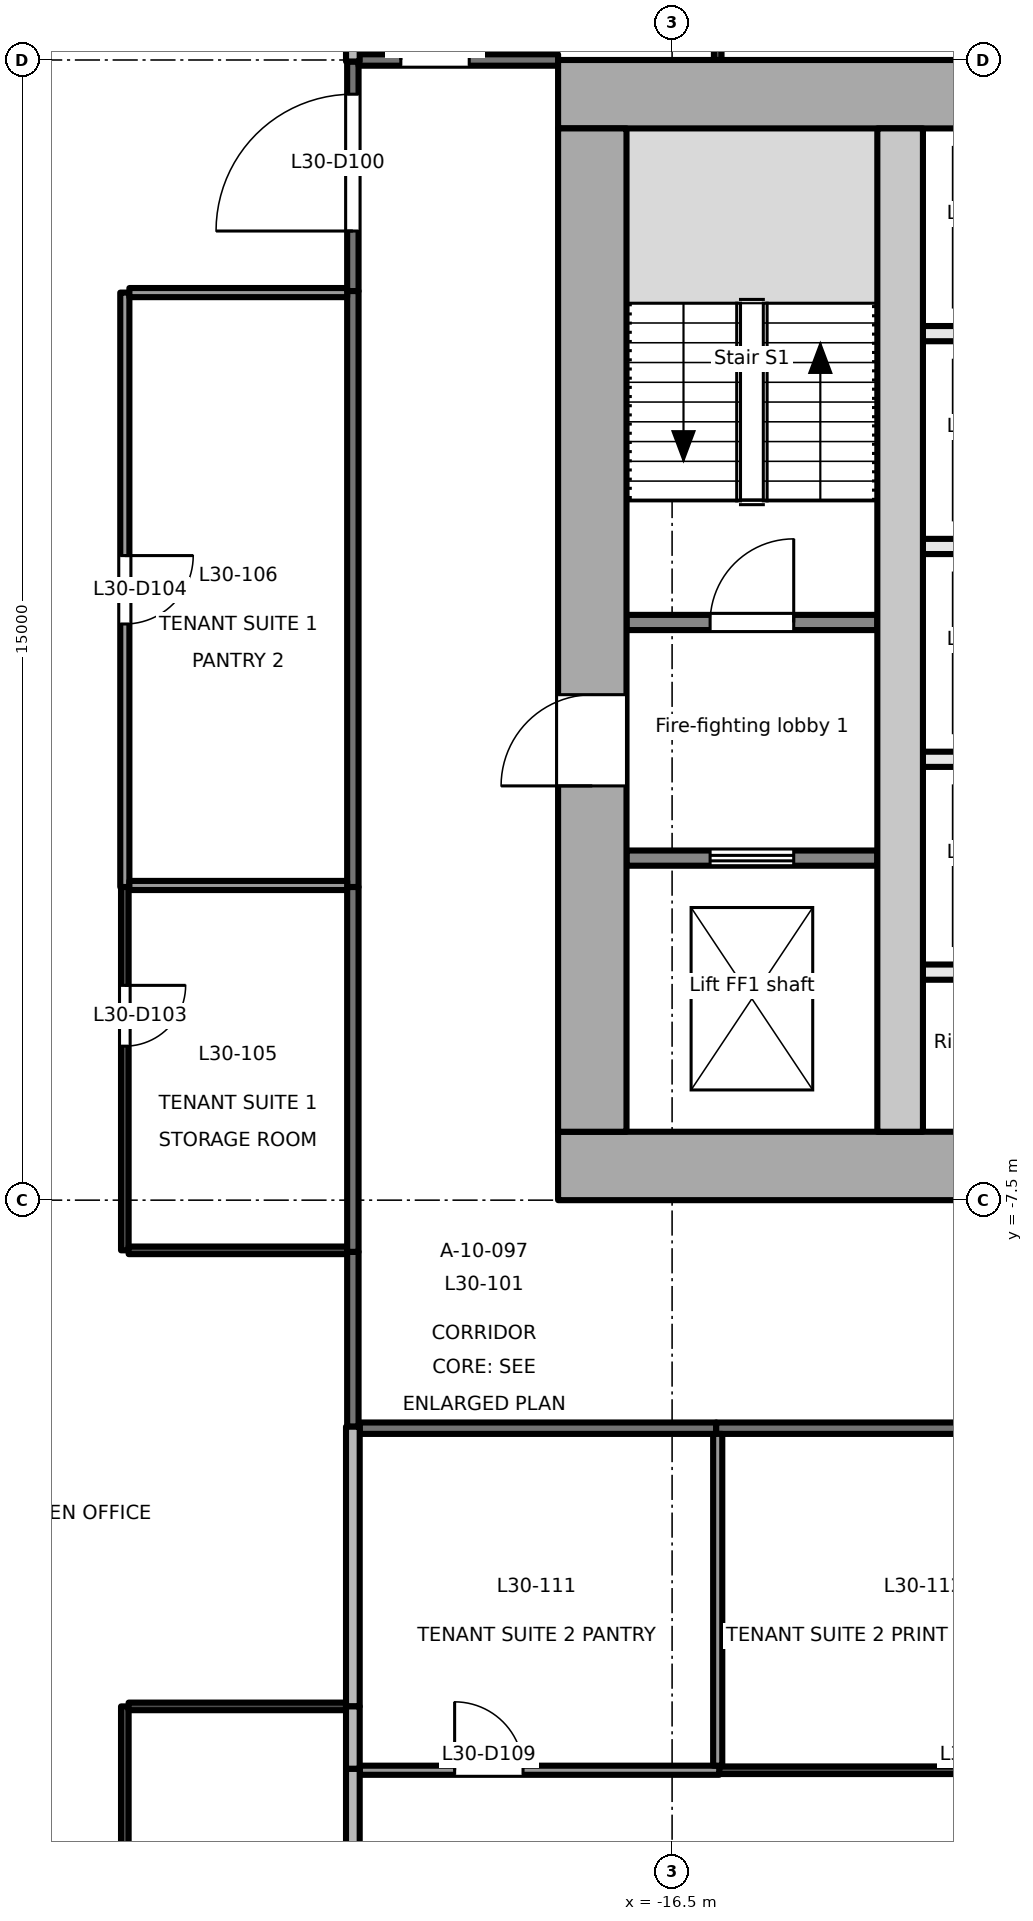
"""IFC4 building model, lengths in metres.
Left out: names, types, materials, properties, quantities, classifications, styles, units other than length and angle.
Written with IfcOpenShell. Run it as: python <this file> out.ifc"""

import sys

from ifc_helpers import new_model, si_unit, direction, frame, frame_2d, origin, place, context, subcontext, project, spatial, rectangle, extrude, element, fill, save


model = new_model("IFC4")
c1 = context("Model", 3, precision=1e-05, world=origin(), true_north=direction((0.0, 1.0)))
c2 = subcontext(c1, "Body", "Model", "MODEL_VIEW")
j1 = project(units=[si_unit("LENGTHUNIT", "METRE"), si_unit("PLANEANGLEUNIT", "RADIAN")], contexts=[c1])
p1 = place(None, origin())
s1 = spatial("IfcSite", under=j1, at=p1, CompositionType="ELEMENT")
p2 = place(p1, origin())
s2 = spatial("IfcBuilding", under=s1, at=p2, CompositionType="ELEMENT")
p3 = place(p2, frame((0.0, 0.0, 134.1)))
s3 = spatial("IfcBuildingStorey", under=s2, at=p3, CompositionType="ELEMENT", Elevation=134.1)
p4 = place(p3, frame((-18.0, -7.05, -0.2), z_axis=(0.0, 0.0, 1.0), x_axis=(1.0, 0.0, 0.0)))
e1 = element("IfcWall", 1, at=p4, inside=s3, PredefinedType="SHEAR", context=c2, shape_type="SweptSolid", body=[
    extrude(rectangle(XDim=36.0, YDim=0.9, at=frame_2d((18.0, 0.0))), origin(), (0.0, 0.0, 1.0), 4.0),
])
p5 = place(p4, frame((7.8, 0.0, 0.2)))
e2 = element("IfcOpeningElement", 2, at=p5, cuts=e1, PredefinedType="OPENING", context=c2, shape_type="SweptSolid", body=[
    extrude(rectangle(XDim=2.4, YDim=2.1, at=frame_2d((1.2, 1.05))), frame((0.0, 0.46, 0.0), z_axis=(0.0, -1.0, 0.0), x_axis=(1.0, 0.0, 0.0)), (0.0, 0.0, 1.0), 0.921),
])
p6 = place(p4, frame((17.4, 0.0, 0.2)))
e3 = element("IfcOpeningElement", 3, at=p6, cuts=e1, PredefinedType="OPENING", context=c2, shape_type="SweptSolid", body=[
    extrude(rectangle(XDim=1.2, YDim=2.1, at=frame_2d((0.6, 1.05))), frame((0.0, 0.46, 0.0), z_axis=(0.0, -1.0, 0.0), x_axis=(1.0, 0.0, 0.0)), (0.0, 0.0, 1.0), 0.921),
])
p7 = place(p4, frame((26.1, 0.0, 0.2)))
e4 = element("IfcOpeningElement", 4, at=p7, cuts=e1, PredefinedType="OPENING", context=c2, shape_type="SweptSolid", body=[
    extrude(rectangle(XDim=2.4, YDim=2.1, at=frame_2d((1.2, 1.05))), frame((0.0, 0.46, 0.0), z_axis=(0.0, -1.0, 0.0), x_axis=(1.0, 0.0, 0.0)), (0.0, 0.0, 1.0), 0.921),
])
p8 = place(p3, frame((-18.0, 7.05, -0.2), z_axis=(0.0, 0.0, 1.0), x_axis=(1.0, 0.0, 0.0)))
e5 = element("IfcWall", 5, at=p8, inside=s3, PredefinedType="SHEAR", context=c2, shape_type="SweptSolid", body=[
    extrude(rectangle(XDim=36.0, YDim=0.9, at=frame_2d((18.0, 0.0))), origin(), (0.0, 0.0, 1.0), 4.0),
])
p9 = place(p3, frame((-17.55, -6.6, -0.2), z_axis=(0.0, 0.0, 1.0), x_axis=(0.0, 1.0, 0.0)))
e6 = element("IfcWall", 6, at=p9, inside=s3, PredefinedType="SHEAR", context=c2, shape_type="SweptSolid", body=[
    extrude(rectangle(XDim=13.2, YDim=0.9, at=frame_2d((6.6, 0.0))), origin(), (0.0, 0.0, 1.0), 4.0),
])
p10 = place(p9, frame((4.55, 0.0, 0.2)))
e7 = element("IfcOpeningElement", 7, at=p10, cuts=e6, PredefinedType="OPENING", context=c2, shape_type="SweptSolid", body=[
    extrude(rectangle(XDim=1.2, YDim=2.1, at=frame_2d((0.6, 1.05))), frame((0.0, 0.46, 0.0), z_axis=(0.0, -1.0, 0.0), x_axis=(1.0, 0.0, 0.0)), (0.0, 0.0, 1.0), 0.921),
])
p11 = place(p3, frame((-13.5, -6.6, -0.2), z_axis=(0.0, 0.0, 1.0), x_axis=(0.0, 1.0, 0.0)))
e8 = element("IfcWall", 8, at=p11, inside=s3, PredefinedType="SHEAR", context=c2, shape_type="SweptSolid", body=[
    extrude(rectangle(XDim=13.2, YDim=0.6, at=frame_2d((6.6, 0.0))), origin(), (0.0, 0.0, 1.0), 4.0),
])
p12 = place(p3, frame((-17.1, -3.0, 0.0), z_axis=(0.0, 0.0, 1.0), x_axis=(1.0, 0.0, 0.0)))
e9 = element("IfcWall", 9, at=p12, inside=s3, PredefinedType="PARTITIONING", context=c2, shape_type="SweptSolid", body=[
    extrude(rectangle(XDim=3.3, YDim=0.2, at=frame_2d((1.65, 0.0))), origin(), (0.0, 0.0, 1.0), 3.8),
])
p13 = place(p12, frame((1.1, 0.0, 0.0)))
e10 = element("IfcOpeningElement", 10, at=p13, cuts=e9, PredefinedType="OPENING", context=c2, shape_type="SweptSolid", body=[
    extrude(rectangle(XDim=1.1, YDim=2.1, at=frame_2d((0.55, 1.05))), frame((0.0, 0.111, 0.0), z_axis=(0.0, -1.0, 0.0), x_axis=(1.0, 0.0, 0.0)), (0.0, 0.0, 1.0), 0.221),
])
p14 = place(p3, frame((-17.1, 0.1, 0.0), z_axis=(0.0, 0.0, 1.0), x_axis=(1.0, 0.0, 0.0)))
e11 = element("IfcWall", 11, at=p14, inside=s3, PredefinedType="PARTITIONING", context=c2, shape_type="SweptSolid", body=[
    extrude(rectangle(XDim=3.3, YDim=0.2, at=frame_2d((1.65, 0.0))), origin(), (0.0, 0.0, 1.0), 3.8),
])
p15 = place(p14, frame((1.1, 0.0, 0.0)))
e12 = element("IfcOpeningElement", 12, at=p15, cuts=e11, PredefinedType="OPENING", context=c2, shape_type="SweptSolid", body=[
    extrude(rectangle(XDim=1.1, YDim=2.1, at=frame_2d((0.55, 1.05))), frame((0.0, 0.111, 0.0), z_axis=(0.0, -1.0, 0.0), x_axis=(1.0, 0.0, 0.0)), (0.0, 0.0, 1.0), 0.221),
])
for number, where, z_axis, x_axis in (
    (13, (-13.2, -1.7, 0.0), (0.0, 0.0, 1.0), (1.0, 0.0, 0.0)),
    (14, (-13.2, 1.1, 0.0), (0.0, 0.0, 1.0), (1.0, 0.0, 0.0)),
    (15, (-13.2, 3.9, 0.0), (0.0, 0.0, 1.0), (1.0, 0.0, 0.0)),
    (16, (-13.2, -4.5, 0.0), (0.0, 0.0, 1.0), (1.0, 0.0, 0.0)),
):
    element("IfcWall", number, at=place(p3, frame(where, z_axis=z_axis, x_axis=x_axis)), inside=s3, PredefinedType="PARTITIONING", context=c2, shape_type="SweptSolid", body=[
        extrude(rectangle(XDim=2.3, YDim=0.2, at=frame_2d((1.15, 0.0))), origin(), (0.0, 0.0, 1.0), 3.8),
    ])
p16 = place(p3, frame((-20.7, -10.48, 0.0), z_axis=(0.0, 0.0, 1.0), x_axis=(0.0, 1.0, 0.0)))
e17 = element("IfcWall", 17, at=p16, inside=s3, PredefinedType="PARTITIONING", context=c2, shape_type="SweptSolid", body=[
    extrude(rectangle(XDim=2.3, YDim=0.15, at=frame_2d((1.15, 0.0))), origin(), (0.0, 0.0, 1.0), 3.8),
])
p17 = place(p3, frame((-20.7, 4.46, 0.0), z_axis=(0.0, 0.0, 1.0), x_axis=(0.0, 1.0, 0.0)))
e18 = element("IfcWall", 18, at=p17, inside=s3, PredefinedType="PARTITIONING", context=c2, shape_type="SweptSolid", body=[
    extrude(rectangle(XDim=3.02, YDim=0.15, at=frame_2d((1.51, 0.0))), origin(), (0.0, 0.0, 1.0), 3.3),
])
p18 = place(p17, frame((0.79, 0.0, 0.0)))
e19 = element("IfcOpeningElement", 19, at=p18, cuts=e18, PredefinedType="OPENING", context=c2, shape_type="SweptSolid", body=[
    extrude(rectangle(XDim=1.8, YDim=2.1, at=frame_2d((0.9, 1.05))), frame((0.0, 0.085, 0.0), z_axis=(0.0, -1.0, 0.0), x_axis=(1.0, 0.0, 0.0)), (0.0, 0.0, 1.0), 0.171),
])
p19 = place(p3, frame((-20.7, -8.18, 0.0), z_axis=(0.0, 0.0, 1.0), x_axis=(0.0, 1.0, 0.0)))
e20 = element("IfcWall", 20, at=p19, inside=s3, PredefinedType="PARTITIONING", context=c2, shape_type="SweptSolid", body=[
    extrude(rectangle(XDim=4.8, YDim=0.15, at=frame_2d((2.4, 0.0))), origin(), (0.0, 0.0, 1.0), 3.3),
])
p20 = place(p3, frame((-20.7, -3.38, 0.0), z_axis=(0.0, 0.0, 1.0), x_axis=(0.0, 1.0, 0.0)))
e21 = element("IfcWall", 21, at=p20, inside=s3, PredefinedType="PARTITIONING", context=c2, shape_type="SweptSolid", body=[
    extrude(rectangle(XDim=7.84, YDim=0.15, at=frame_2d((3.92, 0.0))), origin(), (0.0, 0.0, 1.0), 3.3),
])
p21 = place(p3, frame((-15.92, -10.5, 0.0), z_axis=(0.0, 0.0, 1.0), x_axis=(-1.0, 0.0, 0.0)))
e22 = element("IfcWall", 22, at=p21, inside=s3, PredefinedType="PARTITIONING", context=c2, shape_type="SweptSolid", body=[
    extrude(rectangle(XDim=4.69, YDim=0.15, at=frame_2d((2.345, 0.0))), origin(), (0.0, 0.0, 1.0), 3.8),
])
p22 = place(p3, frame((-10.48, -10.5, 0.0), z_axis=(0.0, 0.0, 1.0), x_axis=(-1.0, 0.0, 0.0)))
e23 = element("IfcWall", 23, at=p22, inside=s3, PredefinedType="PARTITIONING", context=c2, shape_type="SweptSolid", body=[
    extrude(rectangle(XDim=5.44, YDim=0.15, at=frame_2d((2.72, 0.0))), origin(), (0.0, 0.0, 1.0), 2.9),
])
p23 = place(p3, frame((-20.625, 7.5, 0.0), z_axis=(0.0, 0.0, 1.0), x_axis=(1.0, 0.0, 0.0)))
e24 = element("IfcWall", 24, at=p23, inside=s3, PredefinedType="PARTITIONING", context=c2, shape_type="SweptSolid", body=[
    extrude(rectangle(XDim=2.625, YDim=0.15, at=frame_2d((1.312, 0.0))), origin(), (0.0, 0.0, 1.0), 3.8),
])
p24 = place(p23, frame((0.556, 0.0, 0.0)))
e25 = element("IfcOpeningElement", 25, at=p24, cuts=e24, PredefinedType="OPENING", context=c2, shape_type="SweptSolid", body=[
    extrude(rectangle(XDim=0.9, YDim=2.1, at=frame_2d((0.45, 1.05))), frame((0.0, 0.085, 0.0), z_axis=(0.0, -1.0, 0.0), x_axis=(1.0, 0.0, 0.0)), (0.0, 0.0, 1.0), 0.171),
])
p25 = place(p3, frame((-23.7, -14.16, 0.0), z_axis=(0.0, 0.0, 1.0), x_axis=(0.0, -1.0, 0.0)))
e26 = element("IfcWall", 26, at=p25, inside=s3, PredefinedType="PARTITIONING", context=c2, shape_type="SweptSolid", body=[
    extrude(rectangle(XDim=5.98, YDim=0.1, at=frame_2d((2.99, 0.0))), origin(), (0.0, 0.0, 1.0), 3.8),
])
p26 = place(p25, frame((3.526, 0.0, 0.0)))
e27 = element("IfcOpeningElement", 27, at=p26, cuts=e26, PredefinedType="OPENING", context=c2, shape_type="SweptSolid", body=[
    extrude(rectangle(XDim=0.8, YDim=2.1, at=frame_2d((0.4, 1.05))), frame((0.0, 0.061, 0.0), z_axis=(0.0, -1.0, 0.0), x_axis=(1.0, 0.0, 0.0)), (0.0, 0.0, 1.0), 0.121),
])
p27 = place(p3, frame((-20.79, -14.16, 0.0), z_axis=(0.0, 0.0, 1.0), x_axis=(-1.0, 0.0, 0.0)))
e28 = element("IfcWall", 28, at=p27, inside=s3, PredefinedType="PARTITIONING", context=c2, shape_type="SweptSolid", body=[
    extrude(rectangle(XDim=2.86, YDim=0.1, at=frame_2d((1.43, 0.0))), origin(), (0.0, 0.0, 1.0), 3.8),
])
p28 = place(p3, frame((-23.7, -3.38, 0.0), z_axis=(0.0, 0.0, 1.0), x_axis=(0.0, -1.0, 0.0)))
e29 = element("IfcWall", 29, at=p28, inside=s3, PredefinedType="PARTITIONING", context=c2, shape_type="SweptSolid", body=[
    extrude(rectangle(XDim=4.78, YDim=0.1, at=frame_2d((2.39, 0.0))), origin(), (0.0, 0.0, 1.0), 3.3),
])
p29 = place(p28, frame((1.294, 0.0, 0.0)))
e30 = element("IfcOpeningElement", 30, at=p29, cuts=e29, PredefinedType="OPENING", context=c2, shape_type="SweptSolid", body=[
    extrude(rectangle(XDim=0.8, YDim=2.1, at=frame_2d((0.4, 1.05))), frame((0.0, 0.061, 0.0), z_axis=(0.0, -1.0, 0.0), x_axis=(1.0, 0.0, 0.0)), (0.0, 0.0, 1.0), 0.121),
])
p30 = place(p3, frame((-23.65, -8.16, 0.0), z_axis=(0.0, 0.0, 1.0), x_axis=(1.0, 0.0, 0.0)))
e31 = element("IfcWall", 31, at=p30, inside=s3, PredefinedType="PARTITIONING", context=c2, shape_type="SweptSolid", body=[
    extrude(rectangle(XDim=2.875, YDim=0.1, at=frame_2d((1.438, 0.0))), origin(), (0.0, 0.0, 1.0), 3.8),
])
p31 = place(p3, frame((-23.7, 4.44, 0.0), z_axis=(0.0, 0.0, 1.0), x_axis=(0.0, -1.0, 0.0)))
e32 = element("IfcWall", 32, at=p31, inside=s3, PredefinedType="PARTITIONING", context=c2, shape_type="SweptSolid", body=[
    extrude(rectangle(XDim=7.82, YDim=0.12, at=frame_2d((3.91, 0.0))), origin(), (0.0, 0.0, 1.0), 3.3),
])
p32 = place(p31, frame((3.46, 0.0, 0.0)))
e33 = element("IfcOpeningElement", 33, at=p32, cuts=e32, PredefinedType="OPENING", context=c2, shape_type="SweptSolid", body=[
    extrude(rectangle(XDim=0.9, YDim=2.1, at=frame_2d((0.45, 1.05))), frame((0.0, 0.071, 0.0), z_axis=(0.0, -1.0, 0.0), x_axis=(1.0, 0.0, 0.0)), (0.0, 0.0, 1.0), 0.141),
])
p33 = place(p3, frame((-20.775, 4.44, 0.0), z_axis=(0.0, 0.0, 1.0), x_axis=(-1.0, 0.0, 0.0)))
e34 = element("IfcWall", 34, at=p33, inside=s3, PredefinedType="PARTITIONING", context=c2, shape_type="SweptSolid", body=[
    extrude(rectangle(XDim=2.865, YDim=0.12, at=frame_2d((1.433, 0.0))), origin(), (0.0, 0.0, 1.0), 3.3),
])
p34 = place(p3, frame((-20.7, -10.48, 0.0), z_axis=(0.0, 0.0, 1.0), x_axis=(0.0, -1.0, 0.0)))
e35 = element("IfcWall", 35, at=p34, inside=s3, PredefinedType="PARTITIONING", context=c2, shape_type="SweptSolid", body=[
    extrude(rectangle(XDim=3.68, YDim=0.18, at=frame_2d((1.84, 0.0))), origin(), (0.0, 0.0, 1.0), 3.8),
])
p35 = place(p3, frame((-20.7, 8.64, 0.0), z_axis=(0.0, 0.0, 1.0), x_axis=(0.0, -1.0, 0.0)))
e36 = element("IfcWall", 36, at=p35, inside=s3, PredefinedType="PARTITIONING", context=c2, shape_type="SweptSolid", body=[
    extrude(rectangle(XDim=1.16, YDim=0.18, at=frame_2d((0.58, 0.0))), origin(), (0.0, 0.0, 1.0), 3.8),
])
p36 = place(p3, frame((-20.7, -14.98, 0.0), z_axis=(0.0, 0.0, 1.0), x_axis=(0.0, -1.0, 0.0)))
e37 = element("IfcWall", 37, at=p36, inside=s3, PredefinedType="PARTITIONING", context=c2, shape_type="SweptSolid", body=[
    extrude(rectangle(XDim=5.18, YDim=0.18, at=frame_2d((2.59, 0.0))), origin(), (0.0, 0.0, 1.0), 3.8),
])
p37 = place(p3, frame((-20.7, -14.16, 0.0), z_axis=(0.0, 0.0, 1.0), x_axis=(0.0, -1.0, 0.0)))
e38 = element("IfcWall", 38, at=p37, inside=s3, PredefinedType="PARTITIONING", context=c2, shape_type="SweptSolid", body=[
    extrude(rectangle(XDim=0.82, YDim=0.18, at=frame_2d((0.41, 0.0))), origin(), (0.0, 0.0, 1.0), 3.8),
])
p38 = place(p3, frame((-23.64, -3.36, 0.0), z_axis=(0.0, 0.0, 1.0), x_axis=(1.0, 0.0, 0.0)))
e39 = element("IfcWall", 39, at=p38, inside=s3, PredefinedType="PARTITIONING", context=c2, shape_type="SweptSolid", body=[
    extrude(rectangle(XDim=2.865, YDim=0.12, at=frame_2d((1.433, 0.0))), origin(), (0.0, 0.0, 1.0), 3.8),
])
p39 = place(p3, frame((-20.61, -15.0, 0.0), z_axis=(0.0, 0.0, 1.0), x_axis=(1.0, 0.0, 0.0)))
e40 = element("IfcWall", 40, at=p39, inside=s3, PredefinedType="PARTITIONING", context=c2, shape_type="SweptSolid", body=[
    extrude(rectangle(XDim=4.73, YDim=0.12, at=frame_2d((2.365, 0.0))), origin(), (0.0, 0.0, 1.0), 3.8),
])
p40 = place(p39, frame((1.249, 0.0, 0.0)))
e41 = element("IfcOpeningElement", 41, at=p40, cuts=e40, PredefinedType="OPENING", context=c2, shape_type="SweptSolid", body=[
    extrude(rectangle(XDim=0.9, YDim=2.1, at=frame_2d((0.45, 1.05))), frame((0.0, 0.071, 0.0), z_axis=(0.0, -1.0, 0.0), x_axis=(1.0, 0.0, 0.0)), (0.0, 0.0, 1.0), 0.141),
])
p41 = place(p3, frame((-15.88, -15.0, 0.0), z_axis=(0.0, 0.0, 1.0), x_axis=(1.0, 0.0, 0.0)))
e42 = element("IfcWall", 42, at=p41, inside=s3, PredefinedType="PARTITIONING", context=c2, shape_type="SweptSolid", body=[
    extrude(rectangle(XDim=5.4, YDim=0.1, at=frame_2d((2.7, 0.0))), origin(), (0.0, 0.0, 1.0), 2.9),
])
p42 = place(p41, frame((3.12, 0.0, 0.0)))
e43 = element("IfcOpeningElement", 43, at=p42, cuts=e42, PredefinedType="OPENING", context=c2, shape_type="SweptSolid", body=[
    extrude(rectangle(XDim=0.8, YDim=2.1, at=frame_2d((0.4, 1.05))), frame((0.0, 0.061, 0.0), z_axis=(0.0, -1.0, 0.0), x_axis=(1.0, 0.0, 0.0)), (0.0, 0.0, 1.0), 0.121),
])
p43 = place(p3, frame((-15.9, -10.575, 0.0), z_axis=(0.0, 0.0, 1.0), x_axis=(0.0, -1.0, 0.0)))
e44 = element("IfcWall", 44, at=p43, inside=s3, PredefinedType="PARTITIONING", context=c2, shape_type="SweptSolid", body=[
    extrude(rectangle(XDim=4.365, YDim=0.12, at=frame_2d((2.183, 0.0))), origin(), (0.0, 0.0, 1.0), 3.8),
])
p44 = place(p3, frame((-15.9, 10.45, 0.0), z_axis=(0.0, 0.0, 1.0), x_axis=(0.0, -1.0, 0.0)))
e45 = element("IfcWall", 45, at=p44, inside=s3, PredefinedType="PARTITIONING", context=c2, shape_type="SweptSolid", body=[
    extrude(rectangle(XDim=2.95, YDim=0.1, at=frame_2d((1.475, 0.0))), origin(), (0.0, 0.0, 1.0), 3.8),
])
p45 = place(p44, frame((0.575, 0.0, 0.9)))
e46 = element("IfcOpeningElement", 46, at=p45, cuts=e45, PredefinedType="OPENING", context=c2, shape_type="SweptSolid", body=[
    extrude(rectangle(XDim=1.8, YDim=1.2, at=frame_2d((0.9, 0.6))), frame((0.0, 0.061, 0.0), z_axis=(0.0, -1.0, 0.0), x_axis=(1.0, 0.0, 0.0)), (0.0, 0.0, 1.0), 0.121),
])
p46 = place(p13, origin())
e47 = element("IfcDoor", 47, at=p46, inside=s3, OperationType="DOUBLE_DOOR_SLIDING", PredefinedType="DOOR", context=c2, shape_type="SweptSolid", body=[
    extrude(rectangle(XDim=1.1, YDim=2.1, at=frame_2d((0.55, 1.05))), frame((0.0, 0.025, 0.0), z_axis=(0.0, -1.0, 0.0), x_axis=(1.0, 0.0, 0.0)), (0.0, 0.0, 1.0), 0.05),
])
fill(e10, e47)
p47 = place(p10, origin())
e48 = element("IfcDoor", 48, at=p47, inside=s3, OperationType="SINGLE_SWING_LEFT", PredefinedType="DOOR", context=c2, shape_type="SweptSolid", body=[
    extrude(rectangle(XDim=1.2, YDim=2.1, at=frame_2d((0.6, 1.05))), frame((0.0, 0.025, 0.0), z_axis=(0.0, -1.0, 0.0), x_axis=(1.0, 0.0, 0.0)), (0.0, 0.0, 1.0), 0.05),
])
fill(e7, e48)
p48 = place(p15, origin())
e49 = element("IfcDoor", 49, at=p48, inside=s3, OperationType="SINGLE_SWING_RIGHT", PredefinedType="DOOR", context=c2, shape_type="SweptSolid", body=[
    extrude(rectangle(XDim=1.1, YDim=2.1, at=frame_2d((0.55, 1.05))), frame((0.0, 0.025, 0.0), z_axis=(0.0, -1.0, 0.0), x_axis=(1.0, 0.0, 0.0)), (0.0, 0.0, 1.0), 0.05),
])
fill(e12, e49)
p49 = place(p18, origin())
e50 = element("IfcDoor", 50, at=p49, inside=s3, OperationType="DOUBLE_DOOR_SINGLE_SWING", PredefinedType="DOOR", context=c2, shape_type="SweptSolid", body=[
    extrude(rectangle(XDim=1.8, YDim=2.1, at=frame_2d((0.9, 1.05))), frame((0.0, 0.025, 0.0), z_axis=(0.0, -1.0, 0.0), x_axis=(1.0, 0.0, 0.0)), (0.0, 0.0, 1.0), 0.05),
])
fill(e19, e50)
p50 = place(p29, origin())
e51 = element("IfcDoor", 51, at=p50, inside=s3, OperationType="SINGLE_SWING_LEFT", PredefinedType="DOOR", context=c2, shape_type="SweptSolid", body=[
    extrude(rectangle(XDim=0.8, YDim=2.1, at=frame_2d((0.4, 1.05))), frame((0.0, 0.025, 0.0), z_axis=(0.0, -1.0, 0.0), x_axis=(1.0, 0.0, 0.0)), (0.0, 0.0, 1.0), 0.05),
])
fill(e30, e51)
p51 = place(p32, origin())
e52 = element("IfcDoor", 52, at=p51, inside=s3, OperationType="SINGLE_SWING_LEFT", PredefinedType="DOOR", context=c2, shape_type="SweptSolid", body=[
    extrude(rectangle(XDim=0.9, YDim=2.1, at=frame_2d((0.45, 1.05))), frame((0.0, 0.025, 0.0), z_axis=(0.0, -1.0, 0.0), x_axis=(1.0, 0.0, 0.0)), (0.0, 0.0, 1.0), 0.05),
])
fill(e33, e52)
p52 = place(p40, origin())
e53 = element("IfcDoor", 53, at=p52, inside=s3, OperationType="SINGLE_SWING_LEFT", PredefinedType="DOOR", context=c2, shape_type="SweptSolid", body=[
    extrude(rectangle(XDim=0.9, YDim=2.1, at=frame_2d((0.45, 1.05))), frame((0.0, 0.025, 0.0), z_axis=(0.0, -1.0, 0.0), x_axis=(1.0, 0.0, 0.0)), (0.0, 0.0, 1.0), 0.05),
])
fill(e41, e53)
p53 = place(p24, origin())
e54 = element("IfcDoor", 54, at=p53, inside=s3, OperationType="SINGLE_SWING_LEFT", PredefinedType="DOOR", context=c2, shape_type="SweptSolid", body=[
    extrude(rectangle(XDim=0.9, YDim=2.1, at=frame_2d((0.45, 1.05))), frame((0.0, 0.025, 0.0), z_axis=(0.0, -1.0, 0.0), x_axis=(1.0, 0.0, 0.0)), (0.0, 0.0, 1.0), 0.05),
])
fill(e25, e54)
save(model, sys.argv[1])
